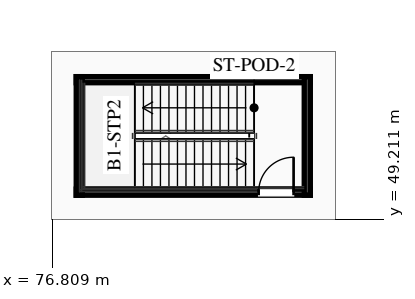
"""IFC4 building model, lengths in metres.
Left out: names, types, materials, properties, quantities, classifications, styles, units other than length and angle.
Written with IfcOpenShell. Run it as: python <this file> out.ifc"""

import sys

from ifc_helpers import new_model, si_unit, direction, frame, frame_2d, origin, place, context, subcontext, project, spatial, rectangle, extrude, element, fill, save


model = new_model("IFC4")
c1 = context("Model", 3, precision=1e-05, world=origin(), true_north=direction((0.0, 1.0)))
c2 = subcontext(c1, "Body", "Model", "MODEL_VIEW")
j1 = project(units=[si_unit("LENGTHUNIT", "METRE"), si_unit("PLANEANGLEUNIT", "RADIAN")], contexts=[c1])
p1 = place(None, origin())
s1 = spatial("IfcSite", under=j1, at=p1, CompositionType="ELEMENT")
p2 = place(p1, origin())
s2 = spatial("IfcBuilding", under=s1, at=p2, CompositionType="ELEMENT")
p3 = place(p2, frame((0.0, 0.0, -5.5)))
s3 = spatial("IfcBuildingStorey", under=s2, at=p3, CompositionType="ELEMENT", Elevation=-5.5)
p4 = place(p3, frame((77.6, 50.1, 0.0), z_axis=(0.0, 0.0, 1.0), x_axis=(1.0, 0.0, 0.0)))
e1 = element("IfcWall", 1, at=p4, inside=s3, PredefinedType="SHEAR", context=c2, shape_type="SweptSolid", body=[
    extrude(rectangle(XDim=7.7, YDim=0.2, at=frame_2d((3.85, 0.0))), origin(), (0.0, 0.0, 1.0), 5.2),
])
p5 = place(p4, frame((6.0, 0.0, 0.0)))
e2 = element("IfcOpeningElement", 2, at=p5, cuts=e1, PredefinedType="OPENING", context=c2, shape_type="SweptSolid", body=[
    extrude(rectangle(XDim=1.15, YDim=2.2, at=frame_2d((0.575, 1.1))), frame((0.0, 0.11, 0.0), z_axis=(0.0, -1.0, 0.0), x_axis=(1.0, 0.0, 0.0)), (0.0, 0.0, 1.0), 0.22),
])
p6 = place(p3, frame((77.6, 53.8, 0.0), z_axis=(0.0, 0.0, 1.0), x_axis=(1.0, 0.0, 0.0)))
e3 = element("IfcWall", 3, at=p6, inside=s3, PredefinedType="SHEAR", context=c2, shape_type="SweptSolid", body=[
    extrude(rectangle(XDim=7.7, YDim=0.2, at=frame_2d((3.85, 0.0))), origin(), (0.0, 0.0, 1.0), 5.2),
])
for number, where, z_axis, x_axis in (
    (4, (77.7, 50.0, 0.0), (0.0, 0.0, 1.0), (0.0, 1.0, 0.0)),
    (5, (85.2, 50.0, 0.0), (0.0, 0.0, 1.0), (0.0, 1.0, 0.0)),
):
    element("IfcWall", number, at=place(p3, frame(where, z_axis=z_axis, x_axis=x_axis)), inside=s3, PredefinedType="SHEAR", context=c2, shape_type="SweptSolid", body=[
        extrude(rectangle(XDim=3.9, YDim=0.2, at=frame_2d((1.95, 0.0))), origin(), (0.0, 0.0, 1.0), 5.2),
    ])
p7 = place(p5, origin())
e6 = element("IfcDoor", 6, at=p7, inside=s3, OperationType="SINGLE_SWING_RIGHT", PredefinedType="DOOR", context=c2, shape_type="SweptSolid", body=[
    extrude(rectangle(XDim=1.15, YDim=2.2, at=frame_2d((0.575, 1.1))), frame((0.0, 0.025, 0.0), z_axis=(0.0, -1.0, 0.0), x_axis=(1.0, 0.0, 0.0)), (0.0, 0.0, 1.0), 0.05),
])
fill(e2, e6)
save(model, sys.argv[1])
